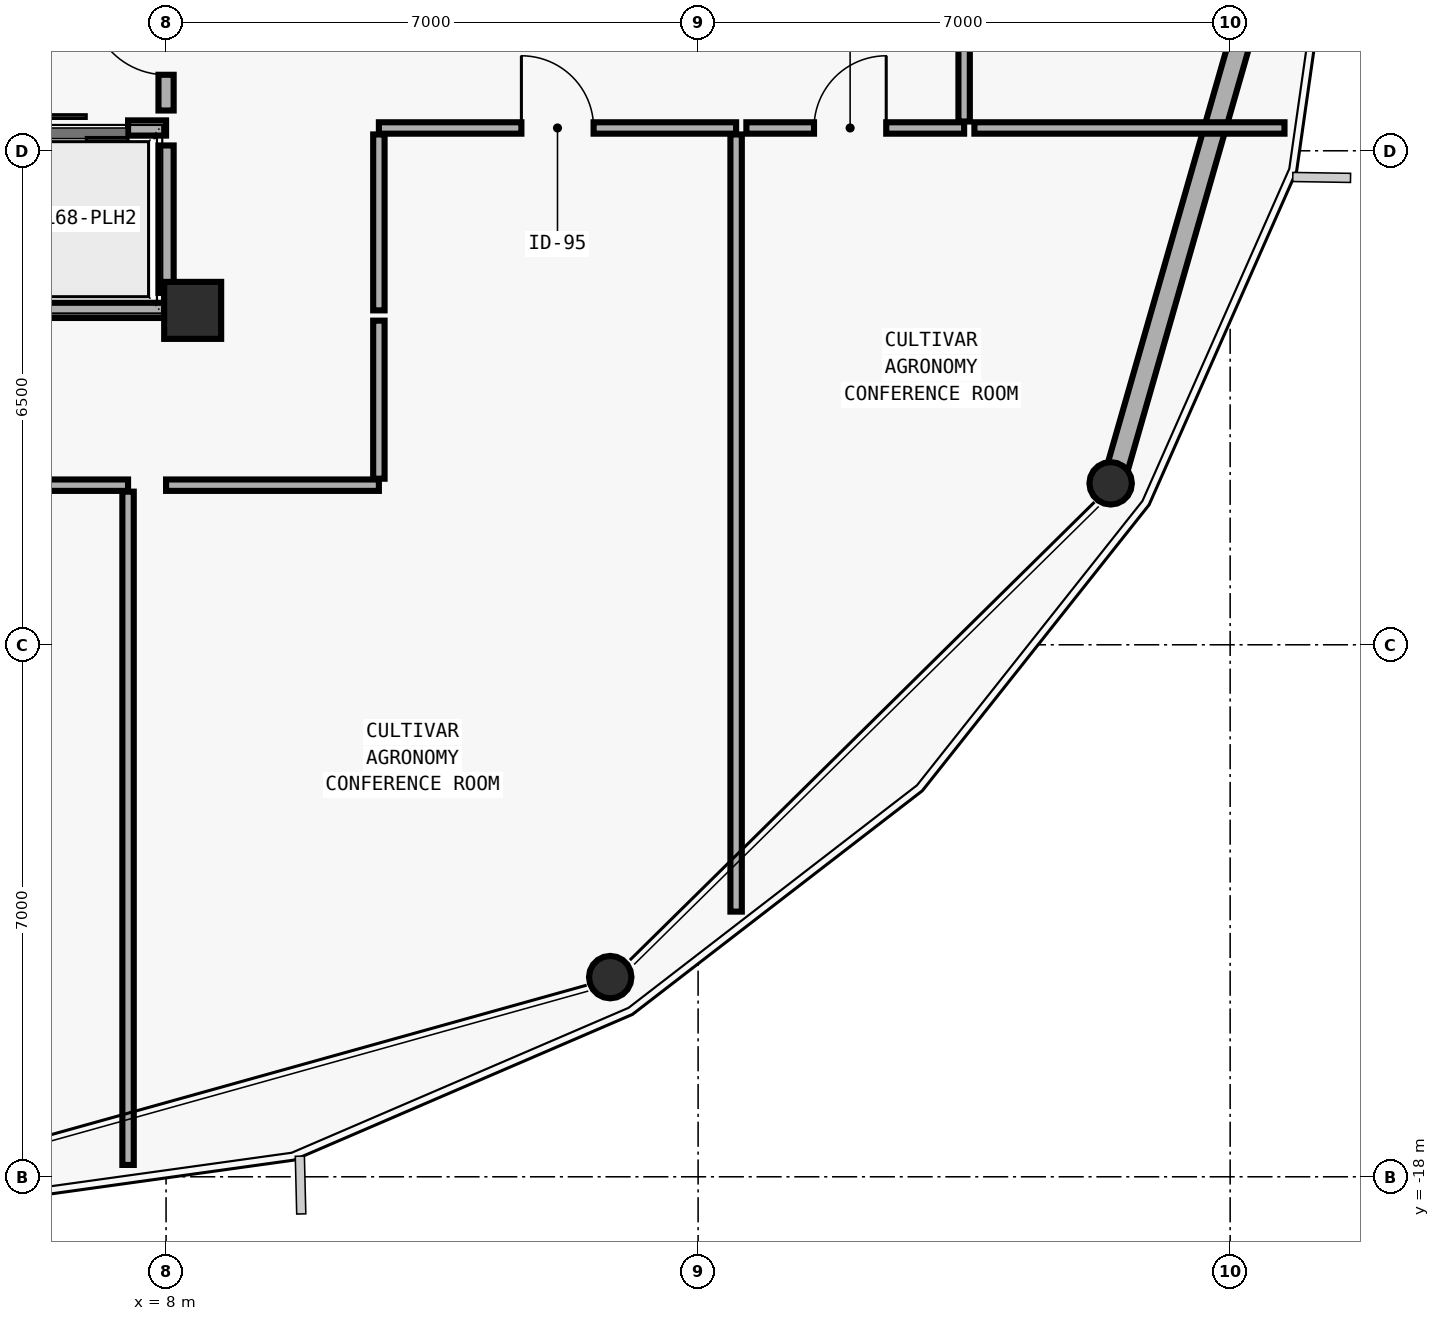
"""IFC4 building model, lengths in metres.
Left out: names, types, materials, properties, quantities, classifications, styles, units other than length and angle.
Written with IfcOpenShell. Run it as: python <this file> out.ifc"""

import sys

from ifc_helpers import new_model, si_unit, direction, frame, frame_2d, origin, origin_2d, place, context, subcontext, project, spatial, rectangle, hollow_circle, extrude, element, fill, save


model = new_model("IFC4")
c1 = context("Model", 3, precision=1e-05, world=origin(), true_north=direction((0.0, 1.0)))
c2 = subcontext(c1, "Body", "Model", "MODEL_VIEW")
j1 = project(units=[si_unit("LENGTHUNIT", "METRE"), si_unit("PLANEANGLEUNIT", "RADIAN")], contexts=[c1])
p1 = place(None, origin())
s1 = spatial("IfcSite", under=j1, at=p1, CompositionType="ELEMENT")
p2 = place(p1, origin())
s2 = spatial("IfcBuilding", under=s1, at=p2, CompositionType="ELEMENT")
p3 = place(p2, frame((0.0, 0.0, 267.0)))
s3 = spatial("IfcBuildingStorey", under=s2, at=p3, CompositionType="ELEMENT", Elevation=267.0)
p4 = place(p3, frame((8.35, -6.6, 0.0), z_axis=(0.0, 0.0, 1.0), x_axis=(1.0, 0.0, 0.0)))
e1 = element("IfcColumn", 1, at=p4, inside=s3, PredefinedType="COLUMN", context=c2, shape_type="SweptSolid", body=[
    extrude(rectangle(XDim=0.75, YDim=0.75, at=origin_2d()), origin(), (0.0, 0.0, 1.0), 3.575),
])
p5 = place(p3, frame((13.861, -15.387, 0.0), z_axis=(-0.009423563403, 0.008194402959, 0.999922021066), x_axis=(-0.656178714925, -0.754605522164, 0.0)))
e2 = element("IfcColumn", 2, at=p5, inside=s3, PredefinedType="COLUMN", context=c2, shape_type="SweptSolid", body=[
    extrude(hollow_circle(Radius=0.28, WallThickness=0.02, at=origin_2d()), origin(), (0.0, 0.0, 1.0), 3.575),
])
p6 = place(p3, frame((20.457, -8.884, 0.0), z_axis=(-0.016182903558, 0.004779760545, 0.999857623625), x_axis=(-0.283261555535, -0.959042695168, 0.0)))
e3 = element("IfcColumn", 3, at=p6, inside=s3, PredefinedType="COLUMN", context=c2, shape_type="SweptSolid", body=[
    extrude(hollow_circle(Radius=0.28, WallThickness=0.02, at=origin_2d()), origin(), (0.0, 0.0, 1.0), 3.575),
])
p7 = place(p3, frame((22.941, -0.225, 0.0), z_axis=(0.0, 0.0, 1.0), x_axis=(-0.275841867593, -0.961203029585, 0.0)))
e4 = element("IfcWall", 4, at=p7, inside=s3, PredefinedType="SOLIDWALL", context=c2, shape_type="SweptSolid", body=[
    extrude(rectangle(XDim=8.774, YDim=0.28, at=frame_2d((4.387, 0.0))), origin(), (0.0, 0.0, 1.0), 2.97),
])
p8 = place(p3, frame((4.0, -4.2, 0.0), z_axis=(0.0, 0.0, 1.0), x_axis=(1.0, 0.0, 0.0)))
e5 = element("IfcWall", 5, at=p8, inside=s3, PredefinedType="SOLIDWALL", context=c2, shape_type="SweptSolid", body=[
    extrude(rectangle(XDim=4.0, YDim=0.2, at=frame_2d((2.0, 0.0))), origin(), (0.0, 0.0, 1.0), 3.36),
])
p9 = place(p8, frame((0.43, 0.0, 0.0)))
e6 = element("IfcOpeningElement", 6, at=p9, cuts=e5, PredefinedType="OPENING", context=c2, shape_type="SweptSolid", body=[
    extrude(rectangle(XDim=1.1, YDim=2.2, at=frame_2d((0.55, 1.1))), frame((0.0, 0.11, 0.0), z_axis=(0.0, -1.0, 0.0), x_axis=(1.0, 0.0, 0.0)), (0.0, 0.0, 1.0), 0.22),
])
p10 = place(p8, frame((2.4, 0.0, 0.0)))
e7 = element("IfcOpeningElement", 7, at=p10, cuts=e5, PredefinedType="OPENING", context=c2, shape_type="SweptSolid", body=[
    extrude(rectangle(XDim=1.1, YDim=2.2, at=frame_2d((0.55, 1.1))), frame((0.0, 0.11, 0.0), z_axis=(0.0, -1.0, 0.0), x_axis=(1.0, 0.0, 0.0)), (0.0, 0.0, 1.0), 0.22),
])
p11 = place(p3, frame((4.0, -6.6, 0.0), z_axis=(0.0, 0.0, 1.0), x_axis=(1.0, 0.0, 0.0)))
e8 = element("IfcWall", 8, at=p11, inside=s3, PredefinedType="SOLIDWALL", context=c2, shape_type="SweptSolid", body=[
    extrude(rectangle(XDim=4.0, YDim=0.2, at=frame_2d((2.0, 0.0))), origin(), (0.0, 0.0, 1.0), 3.072),
])
p12 = place(p3, frame((8.0, -6.37, 0.0), z_axis=(0.0, 0.0, 1.0), x_axis=(0.0, 1.0, 0.0)))
e9 = element("IfcWall", 9, at=p12, inside=s3, PredefinedType="SOLIDWALL", context=c2, shape_type="SweptSolid", body=[
    extrude(rectangle(XDim=1.94, YDim=0.2, at=frame_2d((0.97, 0.0))), origin(), (0.0, 0.0, 1.0), 3.072),
])
p13 = place(p3, frame((8.0, -3.97, 0.0), z_axis=(0.0, 0.0, 1.0), x_axis=(0.0, 1.0, 0.0)))
e10 = element("IfcWall", 10, at=p13, inside=s3, PredefinedType="MOVABLE", context=c2, shape_type="SweptSolid", body=[
    extrude(rectangle(XDim=1.94, YDim=0.2, at=frame_2d((0.97, 0.0))), origin(), (0.0, 0.0, 1.0), 3.072),
])
p14 = place(p13, frame((0.47, 0.0, 0.0)))
e11 = element("IfcOpeningElement", 11, at=p14, cuts=e10, PredefinedType="OPENING", context=c2, shape_type="SweptSolid", body=[
    extrude(rectangle(XDim=1.0, YDim=2.1, at=frame_2d((0.5, 1.05))), frame((0.0, 0.11, 0.0), z_axis=(0.0, -1.0, 0.0), x_axis=(1.0, 0.0, 0.0)), (0.0, 0.0, 1.0), 0.22),
])
p15 = place(p3, frame((-1.0, -8.9, 0.0), z_axis=(0.0, 0.0, 1.0), x_axis=(1.0, 0.0, 0.0)))
e12 = element("IfcWall", 12, at=p15, inside=s3, PredefinedType="PARTITIONING", context=c2, shape_type="SweptSolid", body=[
    extrude(rectangle(XDim=8.5, YDim=0.15, at=frame_2d((4.25, 0.0))), origin(), (0.0, 0.0, 1.0), 3.36),
])
p16 = place(p15, frame((3.775, 0.0, 0.0)))
e13 = element("IfcOpeningElement", 13, at=p16, cuts=e12, PredefinedType="OPENING", context=c2, shape_type="SweptSolid", body=[
    extrude(rectangle(XDim=0.95, YDim=2.1, at=frame_2d((0.475, 1.05))), frame((0.0, 0.085, 0.0), z_axis=(0.0, -1.0, 0.0), x_axis=(1.0, 0.0, 0.0)), (0.0, 0.0, 1.0), 0.17),
])
p17 = place(p3, frame((10.8, -4.2, 0.0), z_axis=(0.0, 0.0, 1.0), x_axis=(1.0, 0.0, 0.0)))
e14 = element("IfcWall", 14, at=p17, inside=s3, PredefinedType="PARTITIONING", context=c2, shape_type="SweptSolid", body=[
    extrude(rectangle(XDim=4.7, YDim=0.15, at=frame_2d((2.35, 0.0))), origin(), (0.0, 0.0, 1.0), 3.36),
])
p18 = place(p17, frame((1.875, 0.0, 0.0)))
e15 = element("IfcOpeningElement", 15, at=p18, cuts=e14, PredefinedType="OPENING", context=c2, shape_type="SweptSolid", body=[
    extrude(rectangle(XDim=0.95, YDim=2.1, at=frame_2d((0.475, 1.05))), frame((0.0, 0.085, 0.0), z_axis=(0.0, -1.0, 0.0), x_axis=(1.0, 0.0, 0.0)), (0.0, 0.0, 1.0), 0.17),
])
p19 = place(p3, frame((15.635, -4.2, 0.0), z_axis=(0.0, 0.0, 1.0), x_axis=(1.0, 0.0, 0.0)))
e16 = element("IfcWall", 16, at=p19, inside=s3, PredefinedType="PARTITIONING", context=c2, shape_type="SweptSolid", body=[
    extrude(rectangle(XDim=2.865, YDim=0.15, at=frame_2d((1.433, 0.0))), origin(), (0.0, 0.0, 1.0), 3.36),
])
p20 = place(p19, frame((0.89, 0.0, 0.0)))
e17 = element("IfcOpeningElement", 17, at=p20, cuts=e16, PredefinedType="OPENING", context=c2, shape_type="SweptSolid", body=[
    extrude(rectangle(XDim=0.95, YDim=2.1, at=frame_2d((0.475, 1.05))), frame((0.0, 0.085, 0.0), z_axis=(0.0, -1.0, 0.0), x_axis=(1.0, 0.0, 0.0)), (0.0, 0.0, 1.0), 0.17),
])
p21 = place(p3, frame((7.5, -8.985, 0.0), z_axis=(0.0, 0.0, 1.0), x_axis=(0.0, -1.0, 0.0)))
e18 = element("IfcWall", 18, at=p21, inside=s3, PredefinedType="PARTITIONING", context=c2, shape_type="SweptSolid", body=[
    extrude(rectangle(XDim=8.859, YDim=0.15, at=frame_2d((4.429, 0.0))), origin(), (0.0, 0.0, 1.0), 2.892),
])
p22 = place(p3, frame((8.0, -8.9, 0.0), z_axis=(0.0, 0.0, 1.0), x_axis=(1.0, 0.0, 0.0)))
e19 = element("IfcWall", 19, at=p22, inside=s3, PredefinedType="PARTITIONING", context=c2, shape_type="SweptSolid", body=[
    extrude(rectangle(XDim=2.8, YDim=0.15, at=frame_2d((1.4, 0.0))), origin(), (0.0, 0.0, 1.0), 3.36),
])
p23 = place(p3, frame((10.8, -6.6, 0.0), z_axis=(0.0, 0.0, 1.0), x_axis=(0.0, 1.0, 0.0)))
e20 = element("IfcWall", 20, at=p23, inside=s3, PredefinedType="PARTITIONING", context=c2, shape_type="SweptSolid", body=[
    extrude(rectangle(XDim=2.315, YDim=0.15, at=frame_2d((1.158, 0.0))), origin(), (0.0, 0.0, 1.0), 3.36),
])
p24 = place(p3, frame((10.8, -8.815, 0.0), z_axis=(0.0, 0.0, 1.0), x_axis=(0.0, 1.0, 0.0)))
e21 = element("IfcWall", 21, at=p24, inside=s3, PredefinedType="PARTITIONING", context=c2, shape_type="SweptSolid", body=[
    extrude(rectangle(XDim=2.08, YDim=0.15, at=frame_2d((1.04, 0.0))), origin(), (0.0, 0.0, 1.0), 3.36),
])
p25 = place(p3, frame((15.5, -4.285, 0.0), z_axis=(0.0, 0.0, 1.0), x_axis=(0.0, -1.0, 0.0)))
e22 = element("IfcWall", 22, at=p25, inside=s3, PredefinedType="PARTITIONING", context=c2, shape_type="SweptSolid", body=[
    extrude(rectangle(XDim=10.226, YDim=0.15, at=frame_2d((5.113, 0.0))), origin(), (0.0, 0.0, 1.0), 3.072),
])
p26 = place(p3, frame((18.635, -4.2, 0.0), z_axis=(0.0, 0.0, 1.0), x_axis=(1.0, 0.0, 0.0)))
e23 = element("IfcWall", 23, at=p26, inside=s3, PredefinedType="PARTITIONING", context=c2, shape_type="SweptSolid", body=[
    extrude(rectangle(XDim=4.08, YDim=0.15, at=frame_2d((2.04, 0.0))), origin(), (0.0, 0.0, 1.0), 3.36),
])
p27 = place(p3, frame((18.5, -4.115, 0.0), z_axis=(0.0, 0.0, 1.0), x_axis=(0.0, 1.0, 0.0)))
e24 = element("IfcWall", 24, at=p27, inside=s3, PredefinedType="PARTITIONING", context=c2, shape_type="SweptSolid", body=[
    extrude(rectangle(XDim=2.23, YDim=0.15, at=frame_2d((1.115, 0.0))), origin(), (0.0, 0.0, 1.0), 3.36),
])
p28 = place(p14, origin())
e25 = element("IfcDoor", 25, at=p28, inside=s3, OperationType="SINGLE_SWING_RIGHT", PredefinedType="DOOR", context=c2, shape_type="SweptSolid", body=[
    extrude(rectangle(XDim=1.0, YDim=2.1, at=frame_2d((0.5, 1.05))), frame((0.0, 0.025, 0.0), z_axis=(0.0, -1.0, 0.0), x_axis=(1.0, 0.0, 0.0)), (0.0, 0.0, 1.0), 0.05),
])
fill(e11, e25)
p29 = place(p18, origin())
e26 = element("IfcDoor", 26, at=p29, inside=s3, OperationType="SINGLE_SWING_LEFT", PredefinedType="DOOR", context=c2, shape_type="SweptSolid", body=[
    extrude(rectangle(XDim=0.95, YDim=2.1, at=frame_2d((0.475, 1.05))), frame((0.0, 0.025, 0.0), z_axis=(0.0, -1.0, 0.0), x_axis=(1.0, 0.0, 0.0)), (0.0, 0.0, 1.0), 0.05),
])
fill(e15, e26)
p30 = place(p20, origin())
e27 = element("IfcDoor", 27, at=p30, inside=s3, OperationType="SINGLE_SWING_RIGHT", PredefinedType="DOOR", context=c2, shape_type="SweptSolid", body=[
    extrude(rectangle(XDim=0.95, YDim=2.1, at=frame_2d((0.475, 1.05))), frame((0.0, 0.025, 0.0), z_axis=(0.0, -1.0, 0.0), x_axis=(1.0, 0.0, 0.0)), (0.0, 0.0, 1.0), 0.05),
])
fill(e17, e27)
p31 = place(p10, origin())
e28 = element("IfcDoor", 28, at=p31, inside=s3, OperationType="DOUBLE_DOOR_SLIDING", PredefinedType="DOOR", context=c2, shape_type="SweptSolid", body=[
    extrude(rectangle(XDim=1.1, YDim=2.2, at=frame_2d((0.55, 1.1))), frame((0.0, 0.025, 0.0), z_axis=(0.0, -1.0, 0.0), x_axis=(1.0, 0.0, 0.0)), (0.0, 0.0, 1.0), 0.05),
])
fill(e7, e28)
save(model, sys.argv[1])
